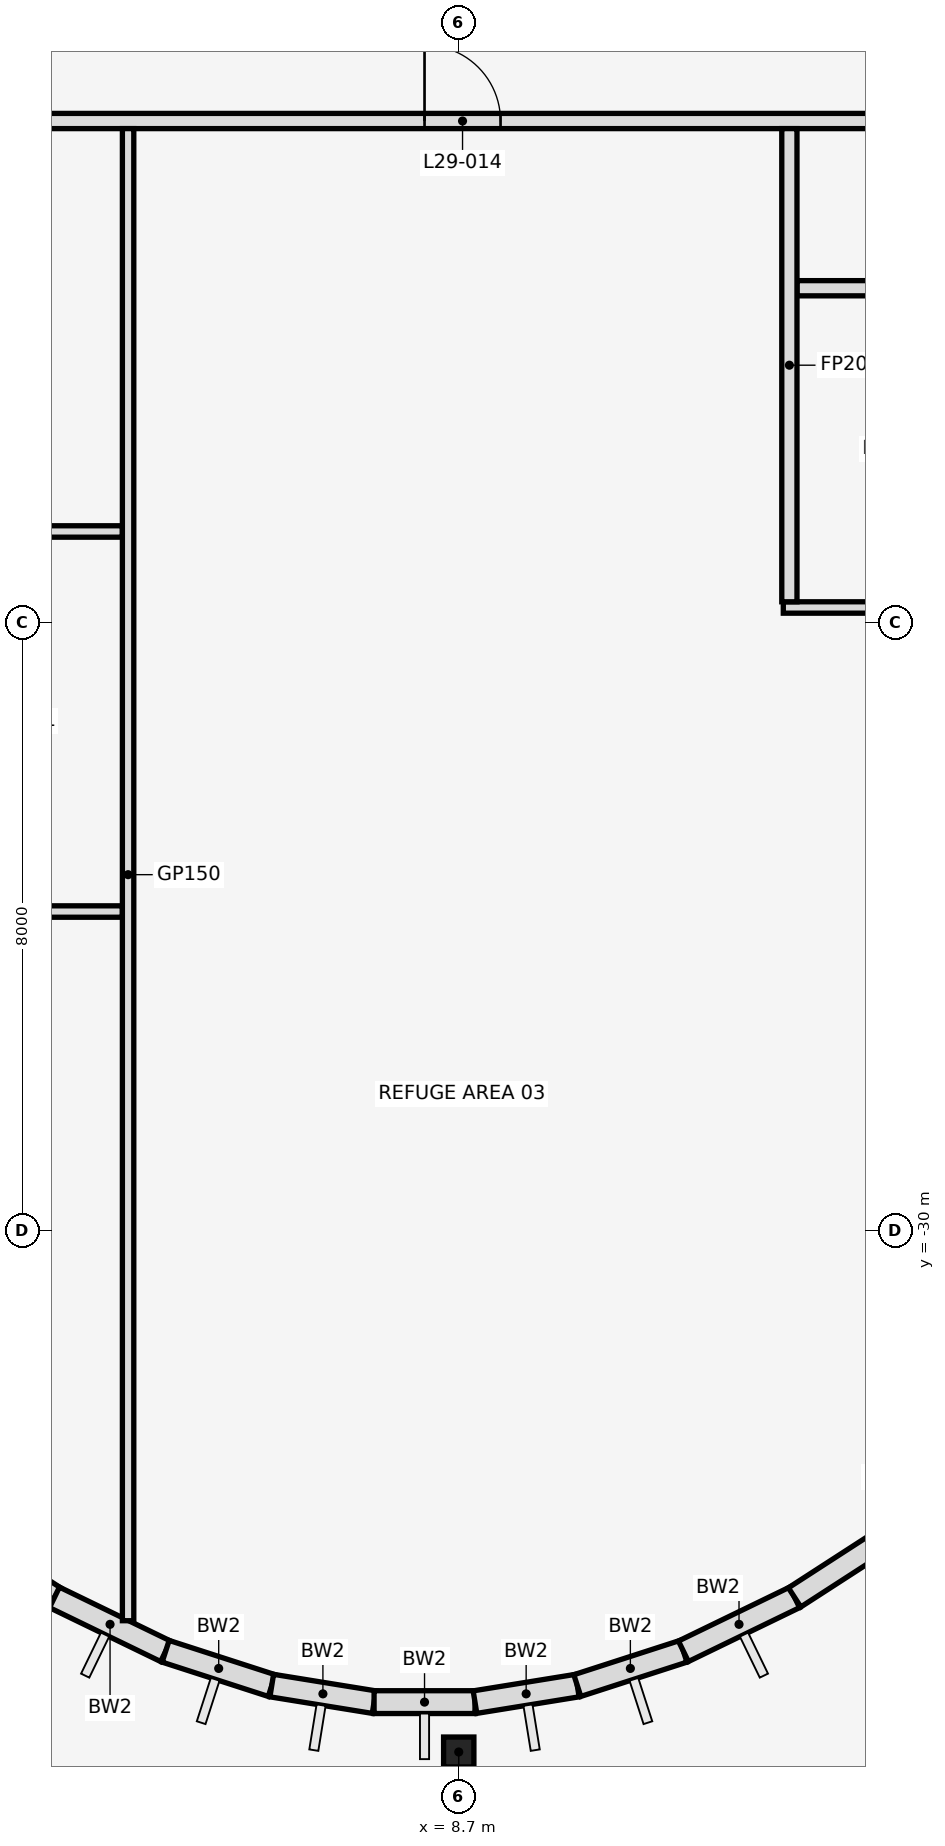
"""IFC4 building model, lengths in metres.
Left out: names, types, materials, properties, quantities, classifications, styles, units other than length and angle.
Written with IfcOpenShell. Run it as: python <this file> out.ifc"""

import sys

from ifc_helpers import new_model, si_unit, direction, frame, frame_2d, origin, origin_2d, place, context, subcontext, project, spatial, rectangle, i_section, extrude, element, fill, save


model = new_model("IFC4")
c1 = context("Model", 3, precision=1e-05, world=origin(), true_north=direction((0.0, 1.0)))
c2 = subcontext(c1, "Body", "Model", "MODEL_VIEW")
j1 = project(units=[si_unit("LENGTHUNIT", "METRE"), si_unit("PLANEANGLEUNIT", "RADIAN")], contexts=[c1])
p1 = place(None, origin())
s1 = spatial("IfcSite", under=j1, at=p1, CompositionType="ELEMENT")
p2 = place(p1, origin())
s2 = spatial("IfcBuilding", under=s1, at=p2, CompositionType="ELEMENT")
p3 = place(p2, frame((0.0, 0.0, 135.0)))
s3 = spatial("IfcBuildingStorey", under=s2, at=p3, CompositionType="ELEMENT", Elevation=135.0)
p4 = place(p3, frame((8.7, -36.857, 0.0), z_axis=(0.0, 0.0, 1.0), x_axis=(1.0, 0.0, 0.0)))
e1 = element("IfcColumn", 1, at=p4, inside=s3, PredefinedType="COLUMN", context=c2, shape_type="SweptSolid", body=[
    extrude(i_section(OverallWidth=0.399, OverallDepth=0.394, WebThickness=0.023, FlangeThickness=0.037, at=origin_2d()), origin(), (0.0, 0.0, 1.0), 5.4),
])
p5 = place(p3, frame((0.081, -32.69, 0.0), z_axis=(0.0, 0.0, 1.0), x_axis=(0.839805110115, -0.542887996759, 0.0)))
e2 = element("IfcWall", 2, at=p5, inside=s3, PredefinedType="STANDARD", context=c2, shape_type="SweptSolid", body=[
    extrude(rectangle(XDim=3.929, YDim=0.3, at=frame_2d((1.965, 0.0))), origin(), (0.0, 0.0, 1.0), 4.28),
])
p6 = place(p3, frame((3.381, -34.823, 0.0), z_axis=(0.0, 0.0, 1.0), x_axis=(0.899798026589, -0.436306671214, 0.0)))
e3 = element("IfcWall", 3, at=p6, inside=s3, PredefinedType="STANDARD", context=c2, shape_type="SweptSolid", body=[
    extrude(rectangle(XDim=1.625, YDim=0.3, at=frame_2d((0.813, 0.0))), origin(), (0.0, 0.0, 1.0), 4.26),
])
p7 = place(p3, frame((4.844, -35.532, 0.0), z_axis=(0.0, 0.0, 1.0), x_axis=(0.951539081691, -0.307527845919, 0.0)))
e4 = element("IfcWall", 4, at=p7, inside=s3, PredefinedType="STANDARD", context=c2, shape_type="SweptSolid", body=[
    extrude(rectangle(XDim=1.467, YDim=0.3, at=frame_2d((0.733, 0.0))), origin(), (0.0, 0.0, 1.0), 5.25),
])
p8 = place(p3, frame((6.24, -35.983, 0.0), z_axis=(0.0, 0.0, 1.0), x_axis=(0.987194777017, -0.15951950423, 0.0)))
e5 = element("IfcWall", 5, at=p8, inside=s3, PredefinedType="STANDARD", context=c2, shape_type="SweptSolid", body=[
    extrude(rectangle(XDim=1.364, YDim=0.3, at=frame_2d((0.682, 0.0))), origin(), (0.0, 0.0, 1.0), 5.25),
])
p9 = place(p3, frame((7.586, -36.201, 0.0), z_axis=(0.0, 0.0, 1.0), x_axis=(1.0, 0.0, 0.0)))
e6 = element("IfcWall", 6, at=p9, inside=s3, PredefinedType="STANDARD", context=c2, shape_type="SweptSolid", body=[
    extrude(rectangle(XDim=1.328, YDim=0.3, at=frame_2d((0.664, 0.0))), origin(), (0.0, 0.0, 1.0), 4.26),
])
p10 = place(p3, frame((8.914, -36.201, 0.0), z_axis=(0.0, 0.0, 1.0), x_axis=(0.987194777017, 0.15951950423, 0.0)))
e7 = element("IfcWall", 7, at=p10, inside=s3, PredefinedType="STANDARD", context=c2, shape_type="SweptSolid", body=[
    extrude(rectangle(XDim=1.364, YDim=0.3, at=frame_2d((0.682, 0.0))), origin(), (0.0, 0.0, 1.0), 4.26),
])
p11 = place(p3, frame((10.26, -35.983, 0.0), z_axis=(0.0, 0.0, 1.0), x_axis=(0.951539081691, 0.307527845919, 0.0)))
e8 = element("IfcWall", 8, at=p11, inside=s3, PredefinedType="STANDARD", context=c2, shape_type="SweptSolid", body=[
    extrude(rectangle(XDim=1.467, YDim=0.3, at=frame_2d((0.733, 0.0))), origin(), (0.0, 0.0, 1.0), 5.25),
])
p12 = place(p3, frame((11.656, -35.532, 0.0), z_axis=(0.0, 0.0, 1.0), x_axis=(0.899798026589, 0.436306671214, 0.0)))
e9 = element("IfcWall", 9, at=p12, inside=s3, PredefinedType="STANDARD", context=c2, shape_type="SweptSolid", body=[
    extrude(rectangle(XDim=1.625, YDim=0.3, at=frame_2d((0.813, 0.0))), origin(), (0.0, 0.0, 1.0), 4.26),
])
p13 = place(p3, frame((13.119, -34.823, 0.0), z_axis=(0.0, 0.0, 1.0), x_axis=(0.839779682339, 0.542927329512, 0.0)))
e10 = element("IfcWall", 10, at=p13, inside=s3, PredefinedType="STANDARD", context=c2, shape_type="SweptSolid", body=[
    extrude(rectangle(XDim=2.875, YDim=0.3, at=frame_2d((1.438, 0.0))), origin(), (0.0, 0.0, 1.0), 4.26),
])
p14 = place(p3, frame((-0.075, -25.8, 0.0), z_axis=(0.0, 0.0, 1.0), x_axis=(1.0, 0.0, 0.0)))
e11 = element("IfcWall", 11, at=p14, inside=s3, PredefinedType="PARTITIONING", context=c2, shape_type="SweptSolid", body=[
    extrude(rectangle(XDim=4.35, YDim=0.15, at=frame_2d((2.175, 0.0))), origin(), (0.0, 0.0, 1.0), 4.24),
])
p15 = place(p3, frame((12.97, -21.8, 0.0), z_axis=(0.0, 0.0, 1.0), x_axis=(1.0, 0.0, 0.0)))
e12 = element("IfcWall", 12, at=p15, inside=s3, PredefinedType="PARTITIONING", context=c2, shape_type="SweptSolid", body=[
    extrude(rectangle(XDim=3.335, YDim=0.15, at=frame_2d((1.667, 0.0))), origin(), (0.0, 0.0, 1.0), 4.24),
])
p16 = place(p3, frame((-0.075, -20.8, 0.0), z_axis=(0.0, 0.0, 1.0), x_axis=(1.0, 0.0, 0.0)))
e13 = element("IfcWall", 13, at=p16, inside=s3, PredefinedType="PARTITIONING", context=c2, shape_type="SweptSolid", body=[
    extrude(rectangle(XDim=4.35, YDim=0.15, at=frame_2d((2.175, 0.0))), origin(), (0.0, 0.0, 1.0), 4.24),
])
p17 = place(p16, frame((1.775, 0.0, 0.0)))
e14 = element("IfcOpeningElement", 14, at=p17, cuts=e13, PredefinedType="OPENING", context=c2, shape_type="SweptSolid", body=[
    extrude(rectangle(XDim=0.9, YDim=2.1, at=frame_2d((0.45, 1.05))), frame((0.0, 0.087, 0.0), z_axis=(0.0, -1.0, 0.0), x_axis=(1.0, 0.0, 0.0)), (0.0, 0.0, 1.0), 0.174),
])
p18 = place(p3, frame((13.15, -17.6, 0.0), z_axis=(0.0, 0.0, 1.0), x_axis=(1.0, 0.0, 0.0)))
e15 = element("IfcWall", 15, at=p18, inside=s3, PredefinedType="PARTITIONING", context=c2, shape_type="SweptSolid", body=[
    extrude(rectangle(XDim=8.5, YDim=0.2, at=frame_2d((4.25, 0.0))), origin(), (0.0, 0.0, 1.0), 4.24),
])
p19 = place(p18, frame((1.1, 0.0, 0.0)))
e16 = element("IfcOpeningElement", 16, at=p19, cuts=e15, PredefinedType="OPENING", context=c2, shape_type="SweptSolid", body=[
    extrude(rectangle(XDim=0.9, YDim=2.1, at=frame_2d((0.45, 1.05))), frame((0.0, 0.112, 0.0), z_axis=(0.0, -1.0, 0.0), x_axis=(1.0, 0.0, 0.0)), (0.0, 0.0, 1.0), 0.224),
])
p20 = place(p18, frame((4.3, 0.0, 0.0)))
e17 = element("IfcOpeningElement", 17, at=p20, cuts=e15, PredefinedType="OPENING", context=c2, shape_type="SweptSolid", body=[
    extrude(rectangle(XDim=0.9, YDim=2.1, at=frame_2d((0.45, 1.05))), frame((0.0, 0.112, 0.0), z_axis=(0.0, -1.0, 0.0), x_axis=(1.0, 0.0, 0.0)), (0.0, 0.0, 1.0), 0.224),
])
p21 = place(p18, frame((6.9, 0.0, 0.0)))
e18 = element("IfcOpeningElement", 18, at=p21, cuts=e15, PredefinedType="OPENING", context=c2, shape_type="SweptSolid", body=[
    extrude(rectangle(XDim=1.0, YDim=2.1, at=frame_2d((0.5, 1.05))), frame((0.0, 0.112, 0.0), z_axis=(0.0, -1.0, 0.0), x_axis=(1.0, 0.0, 0.0)), (0.0, 0.0, 1.0), 0.224),
])
p22 = place(p3, frame((-32.7, -15.4, 0.0), z_axis=(0.0, 0.0, 1.0), x_axis=(1.0, 0.0, 0.0)))
e19 = element("IfcWall", 19, at=p22, inside=s3, PredefinedType="PARTITIONING", context=c2, shape_type="SweptSolid", body=[
    extrude(rectangle(XDim=65.4, YDim=0.2, at=frame_2d((32.7, 0.0))), origin(), (0.0, 0.0, 1.0), 4.24),
])
p23 = place(p22, frame((0.7, 0.0, 0.0)))
e20 = element("IfcOpeningElement", 20, at=p23, cuts=e19, PredefinedType="OPENING", context=c2, shape_type="SweptSolid", body=[
    extrude(rectangle(XDim=0.9, YDim=2.1, at=frame_2d((0.45, 1.05))), frame((0.0, 0.112, 0.0), z_axis=(0.0, -1.0, 0.0), x_axis=(1.0, 0.0, 0.0)), (0.0, 0.0, 1.0), 0.224),
])
p24 = place(p22, frame((5.95, 0.0, 0.0)))
e21 = element("IfcOpeningElement", 21, at=p24, cuts=e19, PredefinedType="OPENING", context=c2, shape_type="SweptSolid", body=[
    extrude(rectangle(XDim=1.0, YDim=2.1, at=frame_2d((0.5, 1.05))), frame((0.0, 0.112, 0.0), z_axis=(0.0, -1.0, 0.0), x_axis=(1.0, 0.0, 0.0)), (0.0, 0.0, 1.0), 0.224),
])
p25 = place(p22, frame((14.85, 0.0, 0.0)))
e22 = element("IfcOpeningElement", 22, at=p25, cuts=e19, PredefinedType="OPENING", context=c2, shape_type="SweptSolid", body=[
    extrude(rectangle(XDim=1.0, YDim=2.1, at=frame_2d((0.5, 1.05))), frame((0.0, 0.112, 0.0), z_axis=(0.0, -1.0, 0.0), x_axis=(1.0, 0.0, 0.0)), (0.0, 0.0, 1.0), 0.224),
])
p26 = place(p22, frame((23.55, 0.0, 0.0)))
e23 = element("IfcOpeningElement", 23, at=p26, cuts=e19, PredefinedType="OPENING", context=c2, shape_type="SweptSolid", body=[
    extrude(rectangle(XDim=1.0, YDim=2.1, at=frame_2d((0.5, 1.05))), frame((0.0, 0.112, 0.0), z_axis=(0.0, -1.0, 0.0), x_axis=(1.0, 0.0, 0.0)), (0.0, 0.0, 1.0), 0.224),
])
p27 = place(p22, frame((34.4, 0.0, 0.0)))
e24 = element("IfcOpeningElement", 24, at=p27, cuts=e19, PredefinedType="OPENING", context=c2, shape_type="SweptSolid", body=[
    extrude(rectangle(XDim=1.0, YDim=2.1, at=frame_2d((0.5, 1.05))), frame((0.0, 0.112, 0.0), z_axis=(0.0, -1.0, 0.0), x_axis=(1.0, 0.0, 0.0)), (0.0, 0.0, 1.0), 0.224),
])
p28 = place(p22, frame((40.95, 0.0, 0.0)))
e25 = element("IfcOpeningElement", 25, at=p28, cuts=e19, PredefinedType="OPENING", context=c2, shape_type="SweptSolid", body=[
    extrude(rectangle(XDim=1.0, YDim=2.1, at=frame_2d((0.5, 1.05))), frame((0.0, 0.112, 0.0), z_axis=(0.0, -1.0, 0.0), x_axis=(1.0, 0.0, 0.0)), (0.0, 0.0, 1.0), 0.224),
])
p29 = place(p22, frame((49.65, 0.0, 0.0)))
e26 = element("IfcOpeningElement", 26, at=p29, cuts=e19, PredefinedType="OPENING", context=c2, shape_type="SweptSolid", body=[
    extrude(rectangle(XDim=0.9, YDim=2.1, at=frame_2d((0.45, 1.05))), frame((0.0, 0.112, 0.0), z_axis=(0.0, -1.0, 0.0), x_axis=(1.0, 0.0, 0.0)), (0.0, 0.0, 1.0), 0.224),
])
p30 = place(p22, frame((58.45, 0.0, 0.0)))
e27 = element("IfcOpeningElement", 27, at=p30, cuts=e19, PredefinedType="OPENING", context=c2, shape_type="SweptSolid", body=[
    extrude(rectangle(XDim=1.0, YDim=2.1, at=frame_2d((0.5, 1.05))), frame((0.0, 0.112, 0.0), z_axis=(0.0, -1.0, 0.0), x_axis=(1.0, 0.0, 0.0)), (0.0, 0.0, 1.0), 0.224),
])
p31 = place(p22, frame((63.85, 0.0, 0.0)))
e28 = element("IfcOpeningElement", 28, at=p31, cuts=e19, PredefinedType="OPENING", context=c2, shape_type="SweptSolid", body=[
    extrude(rectangle(XDim=0.9, YDim=2.1, at=frame_2d((0.45, 1.05))), frame((0.0, 0.112, 0.0), z_axis=(0.0, -1.0, 0.0), x_axis=(1.0, 0.0, 0.0)), (0.0, 0.0, 1.0), 0.224),
])
p32 = place(p3, frame((4.35, -35.13, 0.0), z_axis=(0.0, 0.0, 1.0), x_axis=(0.0, 1.0, 0.0)))
e29 = element("IfcWall", 29, at=p32, inside=s3, PredefinedType="PARTITIONING", context=c2, shape_type="SweptSolid", body=[
    extrude(rectangle(XDim=19.63, YDim=0.15, at=frame_2d((9.815, 0.0))), origin(), (0.0, 0.0, 1.0), 4.24),
])
p33 = place(p3, frame((13.05, -21.725, 0.0), z_axis=(0.0, 0.0, 1.0), x_axis=(0.0, 1.0, 0.0)))
e30 = element("IfcWall", 30, at=p33, inside=s3, PredefinedType="PARTITIONING", context=c2, shape_type="SweptSolid", body=[
    extrude(rectangle(XDim=6.225, YDim=0.2, at=frame_2d((3.113, 0.0))), origin(), (0.0, 0.0, 1.0), 4.24),
])
p34 = place(p28, frame((1.0, 0.0, 0.0), z_axis=(0.0, 0.0, 1.0), x_axis=(-1.0, 0.0, 0.0)))
e31 = element("IfcDoor", 31, at=p34, inside=s3, OperationType="SINGLE_SWING_RIGHT", PredefinedType="DOOR", context=c2, shape_type="SweptSolid", body=[
    extrude(rectangle(XDim=1.0, YDim=2.1, at=frame_2d((0.5, 1.05))), frame((0.0, 0.025, 0.0), z_axis=(0.0, -1.0, 0.0), x_axis=(1.0, 0.0, 0.0)), (0.0, 0.0, 1.0), 0.05),
])
fill(e25, e31)
save(model, sys.argv[1])
